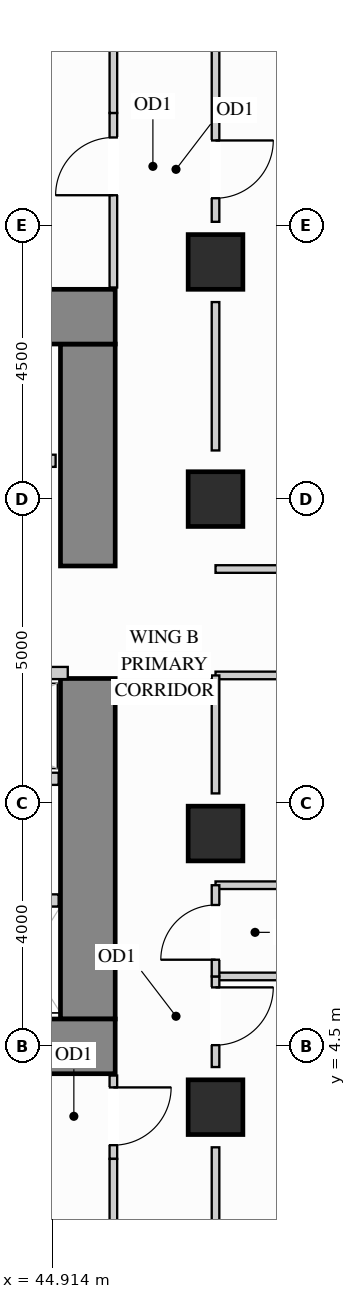
"""IFC4 building model, lengths in metres.
Left out: names, types, materials, properties, quantities, classifications, styles, units other than length and angle.
Written with IfcOpenShell. Run it as: python <this file> out.ifc"""

import sys

from ifc_helpers import new_model, si_unit, direction, frame, frame_2d, origin, origin_2d, place, context, subcontext, project, spatial, rectangle, extrude, source, transform, mapped, element, fill, save


model = new_model("IFC4")
c1 = context("Model", 3, precision=1e-05, world=origin(), true_north=direction((0.0, 1.0)))
c2 = subcontext(c1, "Body", "Model", "MODEL_VIEW")
j1 = project(units=[si_unit("LENGTHUNIT", "METRE"), si_unit("PLANEANGLEUNIT", "RADIAN")], contexts=[c1])
p1 = place(None, origin())
s1 = spatial("IfcSite", under=j1, at=p1, CompositionType="ELEMENT")
p2 = place(p1, origin())
s2 = spatial("IfcBuilding", under=s1, at=p2, CompositionType="ELEMENT")
p3 = place(p2, frame((0.0, 0.0, 26.1)))
s3 = spatial("IfcBuildingStorey", under=s2, at=p3, CompositionType="ELEMENT", Elevation=26.1)
m1 = source(origin(), c2, "Body", "SweptSolid", [
    extrude(rectangle(XDim=0.9, YDim=0.9, at=origin_2d()), origin(), (0.0, 0.0, 1.0), 3.38),
])
for number, where, z_axis, x_axis in (
    (1, (47.6, 13.5, 0.0), (0.0, 0.0, 1.0), (1.0, 0.0, 0.0)),
    (2, (47.6, 3.5, 0.0), (0.0, 0.0, 1.0), (1.0, 0.0, 0.0)),
    (3, (47.6, 8.0, 0.0), (0.0, 0.0, 1.0), (1.0, 0.0, 0.0)),
    (4, (47.6, 17.4, 0.0), (0.0, 0.0, 1.0), (1.0, 0.0, 0.0)),
):
    element("IfcColumn", number, at=place(p3, frame(where, z_axis=z_axis, x_axis=x_axis)), inside=s3, PredefinedType="COLUMN", context=c2, shape_type="MappedRepresentation", body=[
        mapped(m1, transform((0.0, 0.0, 0.0), x_axis=(1.0, 0.0, 0.0), y_axis=(0.0, 1.0, 0.0), z_axis=(0.0, 0.0, 1.0))),
    ])
m2 = source(origin(), c2, "Body", "SweptSolid", [
    extrude(rectangle(XDim=5.6, YDim=0.9, at=frame_2d((2.8, 0.0))), origin(), (0.0, 0.0, 1.0), 3.38),
])
p4 = place(p3, frame((45.5, 4.95, 0.0), z_axis=(0.0, 0.0, 1.0), x_axis=(0.0, 1.0, 0.0)))
e5 = element("IfcWall", 5, at=p4, inside=s3, PredefinedType="SHEAR", context=c2, shape_type="MappedRepresentation", body=[
    mapped(m2, transform((0.0, 0.0, 0.0), x_axis=(1.0, 0.0, 0.0), y_axis=(0.0, 1.0, 0.0), z_axis=(0.0, 0.0, 1.0))),
])
m3 = source(origin(), c2, "Body", "SweptSolid", [
    extrude(rectangle(XDim=3.65, YDim=0.9, at=frame_2d((1.825, 0.0))), origin(), (0.0, 0.0, 1.0), 3.38),
])
p5 = place(p3, frame((45.5, 12.4, 0.0), z_axis=(0.0, 0.0, 1.0), x_axis=(0.0, 1.0, 0.0)))
e6 = element("IfcWall", 6, at=p5, inside=s3, PredefinedType="SHEAR", context=c2, shape_type="MappedRepresentation", body=[
    mapped(m3, transform((0.0, 0.0, 0.0), x_axis=(1.0, 0.0, 0.0), y_axis=(0.0, 1.0, 0.0), z_axis=(0.0, 0.0, 1.0))),
])
m4 = source(origin(), c2, "Body", "SweptSolid", [
    extrude(rectangle(XDim=10.4, YDim=0.9, at=frame_2d((5.2, 0.0))), origin(), (0.0, 0.0, 1.0), 3.38),
])
for number, where, z_axis, x_axis in (
    (7, (35.55, 16.5, 0.0), (0.0, 0.0, 1.0), (1.0, 0.0, 0.0)),
    (8, (35.55, 4.5, 0.0), (0.0, 0.0, 1.0), (1.0, 0.0, 0.0)),
):
    element("IfcWall", number, at=place(p3, frame(where, z_axis=z_axis, x_axis=x_axis)), inside=s3, PredefinedType="SHEAR", context=c2, shape_type="MappedRepresentation", body=[
        mapped(m4, transform((0.0, 0.0, 0.0), x_axis=(1.0, 0.0, 0.0), y_axis=(0.0, 1.0, 0.0), z_axis=(0.0, 0.0, 1.0))),
    ])
m5 = source(origin(), c2, "Body", "SweptSolid", [
    extrude(rectangle(XDim=11.048, YDim=0.125, at=frame_2d((5.524, 0.0))), origin(), (0.0, 0.0, 1.0), 3.365),
])
for number, where, z_axis, x_axis in (
    (9, (47.6, 5.65, 0.0), (0.0, 0.0, 1.0), (1.0, 0.0, 0.0)),
    (10, (47.6, 7.15, 0.0), (0.0, 0.0, 1.0), (1.0, 0.0, 0.0)),
):
    element("IfcWall", number, at=place(p3, frame(where, z_axis=z_axis, x_axis=x_axis)), inside=s3, PredefinedType="PARTITIONING", context=c2, shape_type="MappedRepresentation", body=[
        mapped(m5, transform((0.0, 0.0, 0.0), x_axis=(1.0, 0.0, 0.0), y_axis=(0.0, 1.0, 0.0), z_axis=(0.0, 0.0, 1.0))),
    ])
m6 = source(origin(), c2, "Body", "SweptSolid", [
    extrude(rectangle(XDim=3.8, YDim=0.125, at=frame_2d((1.9, 0.0))), origin(), (0.0, 0.0, 1.0), 3.365),
])
p6 = place(p3, frame((47.6, 12.35, 0.0), z_axis=(0.0, 0.0, 1.0), x_axis=(1.0, 0.0, 0.0)))
e11 = element("IfcWall", 11, at=p6, inside=s3, PredefinedType="PARTITIONING", context=c2, shape_type="MappedRepresentation", body=[
    mapped(m6, transform((0.0, 0.0, 0.0), x_axis=(1.0, 0.0, 0.0), y_axis=(0.0, 1.0, 0.0), z_axis=(0.0, 0.0, 1.0))),
])
p7 = place(p3, frame((47.6, 10.6, 0.0), z_axis=(0.0, 0.0, 1.0), x_axis=(1.0, 0.0, 0.0)))
e12 = element("IfcWall", 12, at=p7, inside=s3, PredefinedType="PARTITIONING", context=c2, shape_type="SweptSolid", body=[
    extrude(rectangle(XDim=3.8, YDim=0.125, at=frame_2d((1.9, 0.0))), origin(), (0.0, 0.0, 1.0), 2.67),
])
p8 = place(p7, frame((1.425, 0.0, 0.0)))
e13 = element("IfcOpeningElement", 13, at=p8, cuts=e12, PredefinedType="OPENING", context=c2, shape_type="SweptSolid", body=[
    extrude(rectangle(XDim=0.95, YDim=2.15, at=frame_2d((0.475, 1.075))), frame((0.0, 0.073, 0.0), z_axis=(0.0, -1.0, 0.0), x_axis=(1.0, 0.0, 0.0)), (0.0, 0.0, 1.0), 0.145),
])
p9 = place(p3, frame((47.6, 4.16, 0.0), z_axis=(0.0, 0.0, 1.0), x_axis=(0.0, 1.0, 0.0)))
e14 = element("IfcWall", 14, at=p9, inside=s3, PredefinedType="PARTITIONING", context=c2, shape_type="SweptSolid", body=[
    extrude(rectangle(XDim=1.49, YDim=0.125, at=frame_2d((0.745, 0.0))), origin(), (0.0, 0.0, 1.0), 2.67),
])
p10 = place(p9, frame((0.36, 0.0, 0.0)))
e15 = element("IfcOpeningElement", 15, at=p10, cuts=e14, PredefinedType="OPENING", context=c2, shape_type="SweptSolid", body=[
    extrude(rectangle(XDim=0.95, YDim=2.15, at=frame_2d((0.475, 1.075))), frame((0.0, 0.073, 0.0), z_axis=(0.0, -1.0, 0.0), x_axis=(1.0, 0.0, 0.0)), (0.0, 0.0, 1.0), 0.145),
])
m7 = source(origin(), c2, "Body", "SweptSolid", [
    extrude(rectangle(XDim=1.58, YDim=0.125, at=frame_2d((0.79, 0.0))), origin(), (0.0, 0.0, 1.0), 2.67),
])
p11 = place(p3, frame((47.6, 1.26, 0.0), z_axis=(0.0, 0.0, 1.0), x_axis=(0.0, 1.0, 0.0)))
e16 = element("IfcWall", 16, at=p11, inside=s3, PredefinedType="PARTITIONING", context=c2, shape_type="MappedRepresentation", body=[
    mapped(m7, transform((0.0, 0.0, 0.0), x_axis=(1.0, 0.0, 0.0), y_axis=(0.0, 1.0, 0.0), z_axis=(0.0, 0.0, 1.0))),
])
m8 = source(origin(), c2, "Body", "SweptSolid", [
    extrude(rectangle(XDim=1.94, YDim=0.125, at=frame_2d((0.97, 0.0))), origin(), (0.0, 0.0, 1.0), 2.67),
])
p12 = place(p3, frame((47.6, 8.66, 0.0), z_axis=(0.0, 0.0, 1.0), x_axis=(0.0, 1.0, 0.0)))
e17 = element("IfcWall", 17, at=p12, inside=s3, PredefinedType="PARTITIONING", context=c2, shape_type="MappedRepresentation", body=[
    mapped(m8, transform((0.0, 0.0, 0.0), x_axis=(1.0, 0.0, 0.0), y_axis=(0.0, 1.0, 0.0), z_axis=(0.0, 0.0, 1.0))),
])
m9 = source(origin(), c2, "Body", "SweptSolid", [
    extrude(rectangle(XDim=2.44, YDim=0.125, at=frame_2d((1.22, 0.0))), origin(), (0.0, 0.0, 1.0), 2.67),
])
p13 = place(p3, frame((47.6, 14.3, 0.0), z_axis=(0.0, 0.0, 1.0), x_axis=(0.0, 1.0, 0.0)))
e18 = element("IfcWall", 18, at=p13, inside=s3, PredefinedType="PARTITIONING", context=c2, shape_type="MappedRepresentation", body=[
    mapped(m9, transform((0.0, 0.0, 0.0), x_axis=(1.0, 0.0, 0.0), y_axis=(0.0, 1.0, 0.0), z_axis=(0.0, 0.0, 1.0))),
])
p14 = place(p3, frame((47.6, 18.06, 0.0), z_axis=(0.0, 0.0, 1.0), x_axis=(0.0, 1.0, 0.0)))
e19 = element("IfcWall", 19, at=p14, inside=s3, PredefinedType="PARTITIONING", context=c2, shape_type="SweptSolid", body=[
    extrude(rectangle(XDim=3.18, YDim=0.125, at=frame_2d((1.59, 0.0))), origin(), (0.0, 0.0, 1.0), 2.67),
])
p15 = place(p14, frame((0.388, 0.0, 0.0)))
e20 = element("IfcOpeningElement", 20, at=p15, cuts=e19, PredefinedType="OPENING", context=c2, shape_type="SweptSolid", body=[
    extrude(rectangle(XDim=0.95, YDim=2.15, at=frame_2d((0.475, 1.075))), frame((0.0, 0.073, 0.0), z_axis=(0.0, -1.0, 0.0), x_axis=(1.0, 0.0, 0.0)), (0.0, 0.0, 1.0), 0.145),
])
p16 = place(p3, frame((47.6, 5.65, 0.0), z_axis=(0.0, 0.0, 1.0), x_axis=(0.0, 1.0, 0.0)))
e21 = element("IfcWall", 21, at=p16, inside=s3, PredefinedType="PARTITIONING", context=c2, shape_type="SweptSolid", body=[
    extrude(rectangle(XDim=1.5, YDim=0.125, at=frame_2d((0.75, 0.0))), origin(), (0.0, 0.0, 1.0), 2.67),
])
p17 = place(p16, frame((0.275, 0.0, 0.0)))
e22 = element("IfcOpeningElement", 22, at=p17, cuts=e21, PredefinedType="OPENING", context=c2, shape_type="SweptSolid", body=[
    extrude(rectangle(XDim=0.9, YDim=2.15, at=frame_2d((0.45, 1.075))), frame((0.0, 0.073, 0.0), z_axis=(0.0, -1.0, 0.0), x_axis=(1.0, 0.0, 0.0)), (0.0, 0.0, 1.0), 0.145),
])
p18 = place(p3, frame((45.92, 16.98, 0.0), z_axis=(0.0, 0.0, 1.0), x_axis=(0.0, 1.0, 0.0)))
e23 = element("IfcWall", 23, at=p18, inside=s3, PredefinedType="PARTITIONING", context=c2, shape_type="SweptSolid", body=[
    extrude(rectangle(XDim=2.87, YDim=0.125, at=frame_2d((1.435, 0.0))), origin(), (0.0, 0.0, 1.0), 3.365),
])
p19 = place(p18, frame((1.517, 0.0, 0.0)))
e24 = element("IfcOpeningElement", 24, at=p19, cuts=e23, PredefinedType="OPENING", context=c2, shape_type="SweptSolid", body=[
    extrude(rectangle(XDim=0.95, YDim=2.15, at=frame_2d((0.475, 1.075))), frame((0.0, 0.073, 0.0), z_axis=(0.0, -1.0, 0.0), x_axis=(1.0, 0.0, 0.0)), (0.0, 0.0, 1.0), 0.145),
])
m10 = source(origin(), c2, "Body", "SweptSolid", [
    extrude(rectangle(XDim=2.298, YDim=0.125, at=frame_2d((1.149, 0.0))), origin(), (0.0, 0.0, 1.0), 3.365),
])
p20 = place(p3, frame((45.92, 19.85, 0.0), z_axis=(0.0, 0.0, 1.0), x_axis=(0.0, 1.0, 0.0)))
e25 = element("IfcWall", 25, at=p20, inside=s3, PredefinedType="PARTITIONING", context=c2, shape_type="MappedRepresentation", body=[
    mapped(m10, transform((0.0, 0.0, 0.0), x_axis=(1.0, 0.0, 0.0), y_axis=(0.0, 1.0, 0.0), z_axis=(0.0, 0.0, 1.0))),
])
p21 = place(p3, frame((45.92, 2.65, 0.0), z_axis=(0.0, 0.0, 1.0), x_axis=(0.0, 1.0, 0.0)))
e26 = element("IfcWall", 26, at=p21, inside=s3, PredefinedType="PARTITIONING", context=c2, shape_type="SweptSolid", body=[
    extrude(rectangle(XDim=1.37, YDim=0.125, at=frame_2d((0.685, 0.0))), origin(), (0.0, 0.0, 1.0), 3.365),
])
p22 = place(p21, frame((0.225, 0.0, 0.0)))
e27 = element("IfcOpeningElement", 27, at=p22, cuts=e26, PredefinedType="OPENING", context=c2, shape_type="SweptSolid", body=[
    extrude(rectangle(XDim=0.95, YDim=2.15, at=frame_2d((0.475, 1.075))), frame((0.0, 0.073, 0.0), z_axis=(0.0, -1.0, 0.0), x_axis=(1.0, 0.0, 0.0)), (0.0, 0.0, 1.0), 0.145),
])
p23 = place(p3, frame((45.92, 0.352, 0.0), z_axis=(0.0, 0.0, 1.0), x_axis=(0.0, 1.0, 0.0)))
e28 = element("IfcWall", 28, at=p23, inside=s3, PredefinedType="PARTITIONING", context=c2, shape_type="MappedRepresentation", body=[
    mapped(m10, transform((0.0, 0.0, 0.0), x_axis=(1.0, 0.0, 0.0), y_axis=(0.0, 1.0, 0.0), z_axis=(0.0, 0.0, 1.0))),
])
m11 = source(origin(), c2, "Body", "SweptSolid", [
    extrude(rectangle(XDim=1.17, YDim=0.2, at=frame_2d((0.585, 0.0))), origin(), (0.0, 0.0, 1.0), 3.365),
])
p24 = place(p3, frame((43.85, 6.9, 0.0), z_axis=(0.0, 0.0, 1.0), x_axis=(1.0, 0.0, 0.0)))
e29 = element("IfcWall", 29, at=p24, inside=s3, PredefinedType="PARTITIONING", context=c2, shape_type="MappedRepresentation", body=[
    mapped(m11, transform((0.0, 0.0, 0.0), x_axis=(1.0, 0.0, 0.0), y_axis=(0.0, 1.0, 0.0), z_axis=(0.0, 0.0, 1.0))),
])
p25 = place(p3, frame((42.23, 14.13, 0.0), z_axis=(0.0, 0.0, 1.0), x_axis=(1.0, 0.0, 0.0)))
e30 = element("IfcWall", 30, at=p25, inside=s3, PredefinedType="PARTITIONING", context=c2, shape_type="SweptSolid", body=[
    extrude(rectangle(XDim=2.74, YDim=0.2, at=frame_2d((1.37, 0.0))), origin(), (0.0, 0.0, 1.0), 3.365),
])
p26 = place(p25, frame((0.82, 0.0, 0.0)))
e31 = element("IfcOpeningElement", 31, at=p26, cuts=e30, PredefinedType="OPENING", context=c2, shape_type="SweptSolid", body=[
    extrude(rectangle(XDim=1.1, YDim=2.2, at=frame_2d((0.55, 1.1))), frame((0.0, 0.11, 0.0), z_axis=(0.0, -1.0, 0.0), x_axis=(1.0, 0.0, 0.0)), (0.0, 0.0, 1.0), 0.22),
])
m12 = source(origin(), c2, "Body", "SweptSolid", [
    extrude(rectangle(XDim=3.49, YDim=0.2, at=frame_2d((1.745, 0.0))), origin(), (0.0, 0.0, 1.0), 3.365),
])
p27 = place(p3, frame((41.68, 10.64, 0.0), z_axis=(0.0, 0.0, 1.0), x_axis=(1.0, 0.0, 0.0)))
e32 = element("IfcWall", 32, at=p27, inside=s3, PredefinedType="PARTITIONING", context=c2, shape_type="MappedRepresentation", body=[
    mapped(m12, transform((0.0, 0.0, 0.0), x_axis=(1.0, 0.0, 0.0), y_axis=(0.0, 1.0, 0.0), z_axis=(0.0, 0.0, 1.0))),
])
m13 = source(origin(), c2, "Body", "SweptSolid", [
    extrude(rectangle(XDim=3.34, YDim=0.2, at=frame_2d((1.67, 0.0))), origin(), (0.0, 0.0, 1.0), 3.365),
])
p28 = place(p3, frame((41.68, 8.9, 0.0), z_axis=(0.0, 0.0, 1.0), x_axis=(1.0, 0.0, 0.0)))
e33 = element("IfcWall", 33, at=p28, inside=s3, PredefinedType="PARTITIONING", context=c2, shape_type="MappedRepresentation", body=[
    mapped(m13, transform((0.0, 0.0, 0.0), x_axis=(1.0, 0.0, 0.0), y_axis=(0.0, 1.0, 0.0), z_axis=(0.0, 0.0, 1.0))),
])
m14 = source(origin(), c2, "Body", "SweptSolid", [
    extrude(rectangle(XDim=0.95, YDim=2.15, at=frame_2d((0.475, 1.075))), frame((0.0, 0.025, 0.0), z_axis=(0.0, -1.0, 0.0), x_axis=(1.0, 0.0, 0.0)), (0.0, 0.0, 1.0), 0.05),
])
p29 = place(p19, origin())
e34 = element("IfcDoor", 34, at=p29, inside=s3, OperationType="SINGLE_SWING_LEFT", PredefinedType="DOOR", context=c2, shape_type="MappedRepresentation", body=[
    mapped(m14, transform((0.0, 0.0, 0.0), x_axis=(1.0, 0.0, 0.0), y_axis=(0.0, 1.0, 0.0), z_axis=(0.0, 0.0, 1.0))),
])
fill(e24, e34)
p30 = place(p22, origin())
e35 = element("IfcDoor", 35, at=p30, inside=s3, OperationType="SINGLE_SWING_RIGHT", PredefinedType="DOOR", context=c2, shape_type="MappedRepresentation", body=[
    mapped(m14, transform((0.0, 0.0, 0.0), x_axis=(1.0, 0.0, 0.0), y_axis=(0.0, 1.0, 0.0), z_axis=(0.0, 0.0, 1.0))),
])
fill(e27, e35)
p31 = place(p10, origin())
e36 = element("IfcDoor", 36, at=p31, inside=s3, OperationType="SINGLE_SWING_RIGHT", PredefinedType="DOOR", context=c2, shape_type="MappedRepresentation", body=[
    mapped(m14, transform((0.0, 0.0, 0.0), x_axis=(1.0, 0.0, 0.0), y_axis=(0.0, 1.0, 0.0), z_axis=(0.0, 0.0, 1.0))),
])
fill(e15, e36)
p32 = place(p15, origin())
e37 = element("IfcDoor", 37, at=p32, inside=s3, OperationType="SINGLE_SWING_RIGHT", PredefinedType="DOOR", context=c2, shape_type="MappedRepresentation", body=[
    mapped(m14, transform((0.0, 0.0, 0.0), x_axis=(1.0, 0.0, 0.0), y_axis=(0.0, 1.0, 0.0), z_axis=(0.0, 0.0, 1.0))),
])
fill(e20, e37)
m15 = source(origin(), c2, "Body", "SweptSolid", [
    extrude(rectangle(XDim=0.9, YDim=2.15, at=frame_2d((0.45, 1.075))), frame((0.0, 0.025, 0.0), z_axis=(0.0, -1.0, 0.0), x_axis=(1.0, 0.0, 0.0)), (0.0, 0.0, 1.0), 0.05),
])
p33 = place(p17, origin())
e38 = element("IfcDoor", 38, at=p33, inside=s3, OperationType="SINGLE_SWING_LEFT", PredefinedType="DOOR", context=c2, shape_type="MappedRepresentation", body=[
    mapped(m15, transform((0.0, 0.0, 0.0), x_axis=(1.0, 0.0, 0.0), y_axis=(0.0, 1.0, 0.0), z_axis=(0.0, 0.0, 1.0))),
])
fill(e22, e38)
save(model, sys.argv[1])
